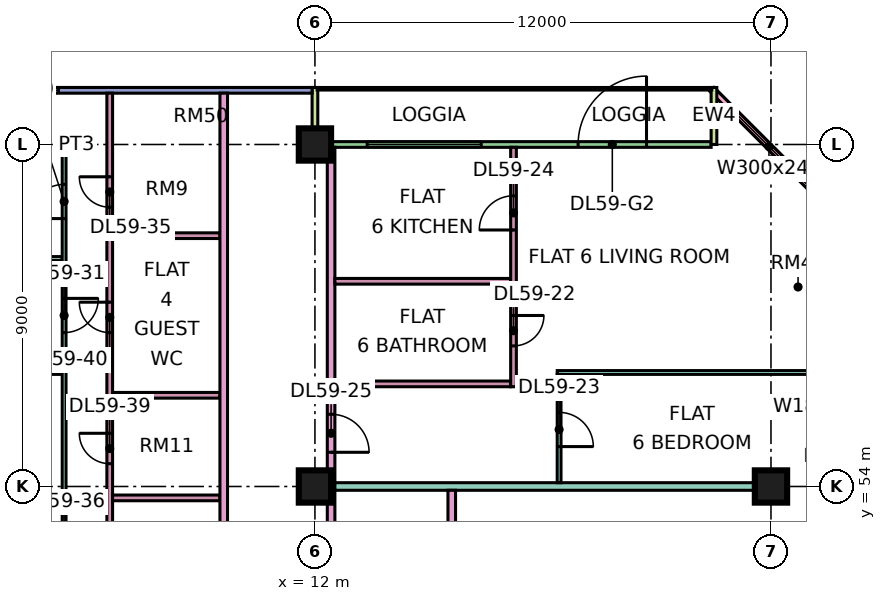
"""IFC4 building model, lengths in metres.
Left out: names, types, materials, properties, quantities, classifications, styles, units other than length and angle.
Written with IfcOpenShell. Run it as: python <this file> out.ifc"""

import sys

from ifc_helpers import new_model, si_unit, direction, frame, frame_2d, origin, origin_2d, place, context, subcontext, project, spatial, rectangle, extrude, element, fill, save


model = new_model("IFC4")
c1 = context("Model", 3, precision=1e-05, world=origin(), true_north=direction((0.0, 1.0)))
c2 = subcontext(c1, "Body", "Model", "MODEL_VIEW")
j1 = project(units=[si_unit("LENGTHUNIT", "METRE"), si_unit("PLANEANGLEUNIT", "RADIAN")], contexts=[c1])
p1 = place(None, origin())
s1 = spatial("IfcSite", under=j1, at=p1, CompositionType="ELEMENT")
p2 = place(p1, origin())
s2 = spatial("IfcBuilding", under=s1, at=p2, CompositionType="ELEMENT")
p3 = place(p2, frame((0.0, 0.0, 249.15)))
s3 = spatial("IfcBuildingStorey", under=s2, at=p3, CompositionType="ELEMENT", Elevation=249.15)
for number, where, z_axis, x_axis in (
    (1, (12.0, 54.0, 0.0), (0.0, 0.0, 1.0), (1.0, 0.0, 0.0)),
    (2, (12.0, 63.0, 0.0), (0.0, 0.0, 1.0), (1.0, 0.0, 0.0)),
    (3, (24.0, 54.0, 0.0), (0.0, 0.0, 1.0), (1.0, 0.0, 0.0)),
):
    element("IfcColumn", number, at=place(p3, frame(where, z_axis=z_axis, x_axis=x_axis)), inside=s3, PredefinedType="COLUMN", context=c2, shape_type="SweptSolid", body=[
        extrude(rectangle(XDim=0.85, YDim=0.85, at=origin_2d()), origin(), (0.0, 0.0, 1.0), 3.75),
    ])
p4 = place(p3, frame((25.447, 61.447, 0.0), z_axis=(0.0, 0.0, 1.0), x_axis=(-0.707106781187, 0.707106781187, 0.0)))
e4 = element("IfcWall", 4, at=p4, inside=s3, PredefinedType="SOLIDWALL", context=c2, shape_type="SweptSolid", body=[
    extrude(rectangle(XDim=4.243, YDim=0.15, at=frame_2d((2.121, 0.0))), origin(), (0.0, 0.0, 1.0), 3.35),
])
p5 = place(p4, frame((0.621, 0.0, 0.45)))
e5 = element("IfcOpeningElement", 5, at=p5, cuts=e4, PredefinedType="OPENING", context=c2, shape_type="SweptSolid", body=[
    extrude(rectangle(XDim=3.0, YDim=2.4, at=frame_2d((1.5, 1.2))), frame((0.0, 0.085, 0.0), z_axis=(0.0, -1.0, 0.0), x_axis=(1.0, 0.0, 0.0)), (0.0, 0.0, 1.0), 0.17),
])
p6 = place(p3, frame((22.425, 63.0, 0.0), z_axis=(0.0, 0.0, 1.0), x_axis=(-1.0, 0.0, 0.0)))
e6 = element("IfcWall", 6, at=p6, inside=s3, PredefinedType="SOLIDWALL", context=c2, shape_type="SweptSolid", body=[
    extrude(rectangle(XDim=10.35, YDim=0.15, at=frame_2d((5.175, 0.0))), origin(), (0.0, 0.0, 1.0), 3.35),
])
p7 = place(p6, frame((1.7, 0.0, 0.0)))
e7 = element("IfcOpeningElement", 7, at=p7, cuts=e6, PredefinedType="OPENING", context=c2, shape_type="SweptSolid", body=[
    extrude(rectangle(XDim=1.8, YDim=2.4, at=frame_2d((0.9, 1.2))), frame((0.0, 0.085, 0.0), z_axis=(0.0, -1.0, 0.0), x_axis=(1.0, 0.0, 0.0)), (0.0, 0.0, 1.0), 0.17),
])
p8 = place(p6, frame((6.05, 0.0, 0.45)))
e8 = element("IfcOpeningElement", 8, at=p8, cuts=e6, PredefinedType="OPENING", context=c2, shape_type="SweptSolid", body=[
    extrude(rectangle(XDim=3.0, YDim=2.4, at=frame_2d((1.5, 1.2))), frame((0.0, 0.085, 0.0), z_axis=(0.0, -1.0, 0.0), x_axis=(1.0, 0.0, 0.0)), (0.0, 0.0, 1.0), 0.17),
])
for number, where, z_axis, x_axis in (
    (9, (22.5, 64.5, 0.0), (0.0, 0.0, 1.0), (0.0, -1.0, 0.0)),
    (10, (12.0, 64.5, 0.0), (0.0, 0.0, 1.0), (0.0, -1.0, 0.0)),
):
    element("IfcWall", number, at=place(p3, frame(where, z_axis=z_axis, x_axis=x_axis)), inside=s3, PredefinedType="SOLIDWALL", context=c2, shape_type="SweptSolid", body=[
        extrude(rectangle(XDim=1.5, YDim=0.15, at=frame_2d((0.75, 0.0))), origin(), (0.0, 0.0, 1.0), 3.35),
    ])
p9 = place(p3, frame((11.925, 64.425, 0.0), z_axis=(0.0, 0.0, 1.0), x_axis=(-1.0, 0.0, 0.0)))
e11 = element("IfcWall", 11, at=p9, inside=s3, PredefinedType="SOLIDWALL", context=c2, shape_type="SweptSolid", body=[
    extrude(rectangle(XDim=10.425, YDim=0.15, at=frame_2d((5.212, 0.0))), origin(), (0.0, 0.0, 1.0), 3.35),
])
p10 = place(p9, frame((6.675, 0.0, 0.45)))
e12 = element("IfcOpeningElement", 12, at=p10, cuts=e11, PredefinedType="OPENING", context=c2, shape_type="SweptSolid", body=[
    extrude(rectangle(XDim=3.0, YDim=2.4, at=frame_2d((1.5, 1.2))), frame((0.0, 0.085, 0.0), z_axis=(0.0, -1.0, 0.0), x_axis=(1.0, 0.0, 0.0)), (0.0, 0.0, 1.0), 0.17),
])
p11 = place(p3, frame((-1.351, 60.0, 0.0), z_axis=(0.0, 0.0, 1.0), x_axis=(1.0, 0.0, 0.0)))
e13 = element("IfcWall", 13, at=p11, inside=s3, PredefinedType="PARTITIONING", context=c2, shape_type="SweptSolid", body=[
    extrude(rectangle(XDim=6.701, YDim=0.1, at=frame_2d((3.351, 0.0))), origin(), (0.0, 0.0, 1.0), 3.35),
])
p12 = place(p3, frame((-1.35, 57.0, 0.0), z_axis=(0.0, 0.0, 1.0), x_axis=(1.0, 0.0, 0.0)))
e14 = element("IfcWall", 14, at=p12, inside=s3, PredefinedType="PARTITIONING", context=c2, shape_type="SweptSolid", body=[
    extrude(rectangle(XDim=6.7, YDim=0.1, at=frame_2d((3.35, 0.0))), origin(), (0.0, 0.0, 1.0), 3.35),
])
p13 = place(p3, frame((5.4, 36.1, 0.0), z_axis=(0.0, 0.0, 1.0), x_axis=(0.0, 1.0, 0.0)))
e15 = element("IfcWall", 15, at=p13, inside=s3, PredefinedType="PARTITIONING", context=c2, shape_type="SweptSolid", body=[
    extrude(rectangle(XDim=26.95, YDim=0.1, at=frame_2d((13.475, 0.0))), origin(), (0.0, 0.0, 1.0), 3.35),
])
p14 = place(p13, frame((0.95, 0.0, 0.0)))
e16 = element("IfcOpeningElement", 16, at=p14, cuts=e15, PredefinedType="OPENING", context=c2, shape_type="SweptSolid", body=[
    extrude(rectangle(XDim=0.9, YDim=2.1, at=frame_2d((0.45, 1.05))), frame((0.0, 0.06, 0.0), z_axis=(0.0, -1.0, 0.0), x_axis=(1.0, 0.0, 0.0)), (0.0, 0.0, 1.0), 0.12),
])
p15 = place(p13, frame((3.95, 0.0, 0.0)))
e17 = element("IfcOpeningElement", 17, at=p15, cuts=e15, PredefinedType="OPENING", context=c2, shape_type="SweptSolid", body=[
    extrude(rectangle(XDim=0.9, YDim=2.1, at=frame_2d((0.45, 1.05))), frame((0.0, 0.06, 0.0), z_axis=(0.0, -1.0, 0.0), x_axis=(1.0, 0.0, 0.0)), (0.0, 0.0, 1.0), 0.12),
])
p16 = place(p13, frame((6.95, 0.0, 0.0)))
e18 = element("IfcOpeningElement", 18, at=p16, cuts=e15, PredefinedType="OPENING", context=c2, shape_type="SweptSolid", body=[
    extrude(rectangle(XDim=0.9, YDim=2.1, at=frame_2d((0.45, 1.05))), frame((0.0, 0.06, 0.0), z_axis=(0.0, -1.0, 0.0), x_axis=(1.0, 0.0, 0.0)), (0.0, 0.0, 1.0), 0.12),
])
p17 = place(p13, frame((9.95, 0.0, 0.0)))
e19 = element("IfcOpeningElement", 19, at=p17, cuts=e15, PredefinedType="OPENING", context=c2, shape_type="SweptSolid", body=[
    extrude(rectangle(XDim=0.9, YDim=2.1, at=frame_2d((0.45, 1.05))), frame((0.0, 0.06, 0.0), z_axis=(0.0, -1.0, 0.0), x_axis=(1.0, 0.0, 0.0)), (0.0, 0.0, 1.0), 0.12),
])
p18 = place(p13, frame((21.95, 0.0, 0.0)))
e20 = element("IfcOpeningElement", 20, at=p18, cuts=e15, PredefinedType="OPENING", context=c2, shape_type="SweptSolid", body=[
    extrude(rectangle(XDim=0.9, YDim=2.1, at=frame_2d((0.45, 1.05))), frame((0.0, 0.06, 0.0), z_axis=(0.0, -1.0, 0.0), x_axis=(1.0, 0.0, 0.0)), (0.0, 0.0, 1.0), 0.12),
])
p19 = place(p13, frame((24.95, 0.0, 0.0)))
e21 = element("IfcOpeningElement", 21, at=p19, cuts=e15, PredefinedType="OPENING", context=c2, shape_type="SweptSolid", body=[
    extrude(rectangle(XDim=0.9, YDim=2.1, at=frame_2d((0.45, 1.05))), frame((0.0, 0.06, 0.0), z_axis=(0.0, -1.0, 0.0), x_axis=(1.0, 0.0, 0.0)), (0.0, 0.0, 1.0), 0.12),
])
p20 = place(p13, frame((15.95, 0.0, 0.0)))
e22 = element("IfcOpeningElement", 22, at=p20, cuts=e15, PredefinedType="OPENING", context=c2, shape_type="SweptSolid", body=[
    extrude(rectangle(XDim=0.9, YDim=2.1, at=frame_2d((0.45, 1.05))), frame((0.0, 0.06, 0.0), z_axis=(0.0, -1.0, 0.0), x_axis=(1.0, 0.0, 0.0)), (0.0, 0.0, 1.0), 0.12),
])
p21 = place(p3, frame((5.45, 63.0, 0.0), z_axis=(0.0, 0.0, 1.0), x_axis=(1.0, 0.0, 0.0)))
e23 = element("IfcWall", 23, at=p21, inside=s3, PredefinedType="PARTITIONING", context=c2, shape_type="SweptSolid", body=[
    extrude(rectangle(XDim=0.55, YDim=0.1, at=frame_2d((0.275, 0.0))), origin(), (0.0, 0.0, 1.0), 3.35),
])
p22 = place(p3, frame((6.6, 50.35, 0.0), z_axis=(0.0, 0.0, 1.0), x_axis=(0.0, 1.0, 0.0)))
e24 = element("IfcWall", 24, at=p22, inside=s3, PredefinedType="PARTITIONING", context=c2, shape_type="SweptSolid", body=[
    extrude(rectangle(XDim=14.0, YDim=0.15, at=frame_2d((7.0, 0.0))), origin(), (0.0, 0.0, 1.0), 3.35),
])
p23 = place(p22, frame((11.0, 0.0, 0.0)))
e25 = element("IfcOpeningElement", 25, at=p23, cuts=e24, PredefinedType="OPENING", context=c2, shape_type="SweptSolid", body=[
    extrude(rectangle(XDim=0.8, YDim=2.1, at=frame_2d((0.4, 1.05))), frame((0.0, 0.085, 0.0), z_axis=(0.0, -1.0, 0.0), x_axis=(1.0, 0.0, 0.0)), (0.0, 0.0, 1.0), 0.17),
])
p24 = place(p22, frame((4.25, 0.0, 0.0)))
e26 = element("IfcOpeningElement", 26, at=p24, cuts=e24, PredefinedType="OPENING", context=c2, shape_type="SweptSolid", body=[
    extrude(rectangle(XDim=0.8, YDim=2.1, at=frame_2d((0.4, 1.05))), frame((0.0, 0.085, 0.0), z_axis=(0.0, -1.0, 0.0), x_axis=(1.0, 0.0, 0.0)), (0.0, 0.0, 1.0), 0.17),
])
p25 = place(p22, frame((7.7, 0.0, 0.0)))
e27 = element("IfcOpeningElement", 27, at=p25, cuts=e24, PredefinedType="OPENING", context=c2, shape_type="SweptSolid", body=[
    extrude(rectangle(XDim=0.8, YDim=2.1, at=frame_2d((0.4, 1.05))), frame((0.0, 0.085, 0.0), z_axis=(0.0, -1.0, 0.0), x_axis=(1.0, 0.0, 0.0)), (0.0, 0.0, 1.0), 0.17),
])
for number, where, z_axis, x_axis in (
    (28, (6.675, 53.7, 0.0), (0.0, 0.0, 1.0), (1.0, 0.0, 0.0)),
    (29, (6.675, 56.4, 0.0), (0.0, 0.0, 1.0), (1.0, 0.0, 0.0)),
    (30, (6.675, 60.6, 0.0), (0.0, 0.0, 1.0), (1.0, 0.0, 0.0)),
):
    element("IfcWall", number, at=place(p3, frame(where, z_axis=z_axis, x_axis=x_axis)), inside=s3, PredefinedType="PARTITIONING", context=c2, shape_type="SweptSolid", body=[
        extrude(rectangle(XDim=2.825, YDim=0.15, at=frame_2d((1.413, 0.0))), origin(), (0.0, 0.0, 1.0), 3.35),
    ])
p26 = place(p3, frame((9.6, 20.0, 0.0), z_axis=(0.0, 0.0, 1.0), x_axis=(0.0, 1.0, 0.0)))
e31 = element("IfcWall", 31, at=p26, inside=s3, PredefinedType="PARTITIONING", context=c2, shape_type="SweptSolid", body=[
    extrude(rectangle(XDim=44.35, YDim=0.2, at=frame_2d((22.175, 0.0))), origin(), (0.0, 0.0, 1.0), 3.35),
])
p27 = place(p26, frame((28.8, 0.0, 0.0)))
e32 = element("IfcOpeningElement", 32, at=p27, cuts=e31, PredefinedType="OPENING", context=c2, shape_type="SweptSolid", body=[
    extrude(rectangle(XDim=1.0, YDim=2.1, at=frame_2d((0.5, 1.05))), frame((0.0, 0.11, 0.0), z_axis=(0.0, -1.0, 0.0), x_axis=(1.0, 0.0, 0.0)), (0.0, 0.0, 1.0), 0.22),
])
p28 = place(p26, frame((0.6, 0.0, 0.0)))
e33 = element("IfcOpeningElement", 33, at=p28, cuts=e31, PredefinedType="OPENING", context=c2, shape_type="SweptSolid", body=[
    extrude(rectangle(XDim=1.2, YDim=2.1, at=frame_2d((0.6, 1.05))), frame((0.0, 0.11, 0.0), z_axis=(0.0, -1.0, 0.0), x_axis=(1.0, 0.0, 0.0)), (0.0, 0.0, 1.0), 0.22),
])
p29 = place(p26, frame((3.9, 0.0, 0.0)))
e34 = element("IfcOpeningElement", 34, at=p29, cuts=e31, PredefinedType="OPENING", context=c2, shape_type="SweptSolid", body=[
    extrude(rectangle(XDim=1.0, YDim=2.1, at=frame_2d((0.5, 1.05))), frame((0.0, 0.11, 0.0), z_axis=(0.0, -1.0, 0.0), x_axis=(1.0, 0.0, 0.0)), (0.0, 0.0, 1.0), 0.22),
])
p30 = place(p3, frame((12.425, 20.0, 0.0), z_axis=(0.0, 0.0, 1.0), x_axis=(0.0, 1.0, 0.0)))
e35 = element("IfcWall", 35, at=p30, inside=s3, PredefinedType="PARTITIONING", context=c2, shape_type="SweptSolid", body=[
    extrude(rectangle(XDim=42.926, YDim=0.2, at=frame_2d((21.463, 0.0))), origin(), (0.0, 0.0, 1.0), 3.35),
])
p31 = place(p30, frame((7.0, 0.0, 0.0)))
e36 = element("IfcOpeningElement", 36, at=p31, cuts=e35, PredefinedType="OPENING", context=c2, shape_type="SweptSolid", body=[
    extrude(rectangle(XDim=1.0, YDim=2.1, at=frame_2d((0.5, 1.05))), frame((0.0, 0.11, 0.0), z_axis=(0.0, -1.0, 0.0), x_axis=(1.0, 0.0, 0.0)), (0.0, 0.0, 1.0), 0.22),
])
p32 = place(p30, frame((12.95, 0.0, 0.0)))
e37 = element("IfcOpeningElement", 37, at=p32, cuts=e35, PredefinedType="OPENING", context=c2, shape_type="SweptSolid", body=[
    extrude(rectangle(XDim=1.0, YDim=2.1, at=frame_2d((0.5, 1.05))), frame((0.0, 0.11, 0.0), z_axis=(0.0, -1.0, 0.0), x_axis=(1.0, 0.0, 0.0)), (0.0, 0.0, 1.0), 0.22),
])
p33 = place(p30, frame((16.75, 0.0, 0.0)))
e38 = element("IfcOpeningElement", 38, at=p33, cuts=e35, PredefinedType="OPENING", context=c2, shape_type="SweptSolid", body=[
    extrude(rectangle(XDim=1.0, YDim=2.1, at=frame_2d((0.5, 1.05))), frame((0.0, 0.11, 0.0), z_axis=(0.0, -1.0, 0.0), x_axis=(1.0, 0.0, 0.0)), (0.0, 0.0, 1.0), 0.22),
])
p34 = place(p30, frame((34.9, 0.0, 0.0)))
e39 = element("IfcOpeningElement", 39, at=p34, cuts=e35, PredefinedType="OPENING", context=c2, shape_type="SweptSolid", body=[
    extrude(rectangle(XDim=1.0, YDim=2.1, at=frame_2d((0.5, 1.05))), frame((0.0, 0.11, 0.0), z_axis=(0.0, -1.0, 0.0), x_axis=(1.0, 0.0, 0.0)), (0.0, 0.0, 1.0), 0.22),
])
p35 = place(p30, frame((1.15, 0.0, 0.0)))
e40 = element("IfcOpeningElement", 40, at=p35, cuts=e35, PredefinedType="OPENING", context=c2, shape_type="SweptSolid", body=[
    extrude(rectangle(XDim=1.8, YDim=2.1, at=frame_2d((0.9, 1.05))), frame((0.0, 0.11, 0.0), z_axis=(0.0, -1.0, 0.0), x_axis=(1.0, 0.0, 0.0)), (0.0, 0.0, 1.0), 0.22),
])
p36 = place(p30, frame((28.6, 0.0, 0.0)))
e41 = element("IfcOpeningElement", 41, at=p36, cuts=e35, PredefinedType="OPENING", context=c2, shape_type="SweptSolid", body=[
    extrude(rectangle(XDim=1.8, YDim=2.1, at=frame_2d((0.9, 1.05))), frame((0.0, 0.11, 0.0), z_axis=(0.0, -1.0, 0.0), x_axis=(1.0, 0.0, 0.0)), (0.0, 0.0, 1.0), 0.22),
])
p37 = place(p3, frame((12.525, 54.0, 0.0), z_axis=(0.0, 0.0, 1.0), x_axis=(1.0, 0.0, 0.0)))
e42 = element("IfcWall", 42, at=p37, inside=s3, PredefinedType="PARTITIONING", context=c2, shape_type="SweptSolid", body=[
    extrude(rectangle(XDim=11.475, YDim=0.2, at=frame_2d((5.738, 0.0))), origin(), (0.0, 0.0, 1.0), 3.35),
])
for number, where, z_axis, x_axis in (
    (43, (12.525, 56.7, 0.0), (0.0, 0.0, 1.0), (1.0, 0.0, 0.0)),
    (44, (12.525, 59.4, 0.0), (0.0, 0.0, 1.0), (1.0, 0.0, 0.0)),
):
    element("IfcWall", number, at=place(p3, frame(where, z_axis=z_axis, x_axis=x_axis)), inside=s3, PredefinedType="PARTITIONING", context=c2, shape_type="SweptSolid", body=[
        extrude(rectangle(XDim=4.625, YDim=0.15, at=frame_2d((2.312, 0.0))), origin(), (0.0, 0.0, 1.0), 3.35),
    ])
p38 = place(p3, frame((15.6, 51.225, 0.0), z_axis=(0.0, 0.0, 1.0), x_axis=(0.0, 1.0, 0.0)))
e45 = element("IfcWall", 45, at=p38, inside=s3, PredefinedType="PARTITIONING", context=c2, shape_type="SweptSolid", body=[
    extrude(rectangle(XDim=2.675, YDim=0.2, at=frame_2d((1.337, 0.0))), origin(), (0.0, 0.0, 1.0), 3.35),
])
p39 = place(p3, frame((17.225, 56.625, 0.0), z_axis=(0.0, 0.0, 1.0), x_axis=(0.0, 1.0, 0.0)))
e46 = element("IfcWall", 46, at=p39, inside=s3, PredefinedType="PARTITIONING", context=c2, shape_type="SweptSolid", body=[
    extrude(rectangle(XDim=6.301, YDim=0.15, at=frame_2d((3.15, 0.0))), origin(), (0.0, 0.0, 1.0), 3.35),
])
p40 = place(p39, frame((1.075, 0.0, 0.0)))
e47 = element("IfcOpeningElement", 47, at=p40, cuts=e46, PredefinedType="OPENING", context=c2, shape_type="SweptSolid", body=[
    extrude(rectangle(XDim=0.8, YDim=2.1, at=frame_2d((0.4, 1.05))), frame((0.0, 0.085, 0.0), z_axis=(0.0, -1.0, 0.0), x_axis=(1.0, 0.0, 0.0)), (0.0, 0.0, 1.0), 0.17),
])
p41 = place(p39, frame((4.125, 0.0, 0.0)))
e48 = element("IfcOpeningElement", 48, at=p41, cuts=e46, PredefinedType="OPENING", context=c2, shape_type="SweptSolid", body=[
    extrude(rectangle(XDim=0.9, YDim=2.1, at=frame_2d((0.45, 1.05))), frame((0.0, 0.085, 0.0), z_axis=(0.0, -1.0, 0.0), x_axis=(1.0, 0.0, 0.0)), (0.0, 0.0, 1.0), 0.17),
])
p42 = place(p3, frame((18.375, 57.0, 0.0), z_axis=(0.0, 0.0, 1.0), x_axis=(1.0, 0.0, 0.0)))
e49 = element("IfcWall", 49, at=p42, inside=s3, PredefinedType="PARTITIONING", context=c2, shape_type="SweptSolid", body=[
    extrude(rectangle(XDim=6.975, YDim=0.1, at=frame_2d((3.488, 0.0))), origin(), (0.0, 0.0, 1.0), 3.35),
])
p43 = place(p3, frame((18.425, 54.1, 0.0), z_axis=(0.0, 0.0, 1.0), x_axis=(0.0, 1.0, 0.0)))
e50 = element("IfcWall", 50, at=p43, inside=s3, PredefinedType="PARTITIONING", context=c2, shape_type="SweptSolid", body=[
    extrude(rectangle(XDim=2.85, YDim=0.1, at=frame_2d((1.425, 0.0))), origin(), (0.0, 0.0, 1.0), 3.35),
])
p44 = place(p43, frame((0.95, 0.0, 0.0)))
e51 = element("IfcOpeningElement", 51, at=p44, cuts=e50, PredefinedType="OPENING", context=c2, shape_type="SweptSolid", body=[
    extrude(rectangle(XDim=0.9, YDim=2.1, at=frame_2d((0.45, 1.05))), frame((0.0, 0.06, 0.0), z_axis=(0.0, -1.0, 0.0), x_axis=(1.0, 0.0, 0.0)), (0.0, 0.0, 1.0), 0.12),
])
p45 = place(p5, origin())
e52 = element("IfcWindow", 52, at=p45, inside=s3, PartitioningType="SINGLE_PANEL", PredefinedType="WINDOW", context=c2, shape_type="SweptSolid", body=[
    extrude(rectangle(XDim=3.0, YDim=2.4, at=frame_2d((1.5, 1.2))), frame((0.0, 0.03, 0.0), z_axis=(0.0, -1.0, 0.0), x_axis=(1.0, 0.0, 0.0)), (0.0, 0.0, 1.0), 0.06),
])
fill(e5, e52)
p46 = place(p7, frame((1.8, 0.0, 0.0), z_axis=(0.0, 0.0, 1.0), x_axis=(-1.0, 0.0, 0.0)))
e53 = element("IfcDoor", 53, at=p46, inside=s3, OperationType="DOUBLE_DOOR_SINGLE_SWING", PredefinedType="DOOR", context=c2, shape_type="SweptSolid", body=[
    extrude(rectangle(XDim=1.8, YDim=2.4, at=frame_2d((0.9, 1.2))), frame((0.0, 0.025, 0.0), z_axis=(0.0, -1.0, 0.0), x_axis=(1.0, 0.0, 0.0)), (0.0, 0.0, 1.0), 0.05),
])
fill(e7, e53)
p47 = place(p8, origin())
e54 = element("IfcWindow", 54, at=p47, inside=s3, PartitioningType="SINGLE_PANEL", PredefinedType="WINDOW", context=c2, shape_type="SweptSolid", body=[
    extrude(rectangle(XDim=3.0, YDim=2.4, at=frame_2d((1.5, 1.2))), frame((0.0, 0.03, 0.0), z_axis=(0.0, -1.0, 0.0), x_axis=(1.0, 0.0, 0.0)), (0.0, 0.0, 1.0), 0.06),
])
fill(e8, e54)
p48 = place(p10, origin())
e55 = element("IfcWindow", 55, at=p48, inside=s3, PartitioningType="SINGLE_PANEL", PredefinedType="WINDOW", context=c2, shape_type="SweptSolid", body=[
    extrude(rectangle(XDim=3.0, YDim=2.4, at=frame_2d((1.5, 1.2))), frame((0.0, 0.03, 0.0), z_axis=(0.0, -1.0, 0.0), x_axis=(1.0, 0.0, 0.0)), (0.0, 0.0, 1.0), 0.06),
])
fill(e12, e55)
p49 = place(p40, origin())
e56 = element("IfcDoor", 56, at=p49, inside=s3, OperationType="SINGLE_SWING_RIGHT", PredefinedType="DOOR", context=c2, shape_type="SweptSolid", body=[
    extrude(rectangle(XDim=0.8, YDim=2.1, at=frame_2d((0.4, 1.05))), frame((0.0, 0.025, 0.0), z_axis=(0.0, -1.0, 0.0), x_axis=(1.0, 0.0, 0.0)), (0.0, 0.0, 1.0), 0.05),
])
fill(e47, e56)
p50 = place(p44, frame((0.9, 0.0, 0.0), z_axis=(0.0, 0.0, 1.0), x_axis=(-1.0, 0.0, 0.0)))
e57 = element("IfcDoor", 57, at=p50, inside=s3, OperationType="SINGLE_SWING_LEFT", PredefinedType="DOOR", context=c2, shape_type="SweptSolid", body=[
    extrude(rectangle(XDim=0.9, YDim=2.1, at=frame_2d((0.45, 1.05))), frame((0.0, 0.025, 0.0), z_axis=(0.0, -1.0, 0.0), x_axis=(1.0, 0.0, 0.0)), (0.0, 0.0, 1.0), 0.05),
])
fill(e51, e57)
p51 = place(p41, origin())
e58 = element("IfcDoor", 58, at=p51, inside=s3, OperationType="SINGLE_SWING_LEFT", PredefinedType="DOOR", context=c2, shape_type="SweptSolid", body=[
    extrude(rectangle(XDim=0.9, YDim=2.1, at=frame_2d((0.45, 1.05))), frame((0.0, 0.025, 0.0), z_axis=(0.0, -1.0, 0.0), x_axis=(1.0, 0.0, 0.0)), (0.0, 0.0, 1.0), 0.05),
])
fill(e48, e58)
p52 = place(p34, frame((1.0, 0.0, 0.0), z_axis=(0.0, 0.0, 1.0), x_axis=(-1.0, 0.0, 0.0)))
e59 = element("IfcDoor", 59, at=p52, inside=s3, OperationType="SINGLE_SWING_LEFT", PredefinedType="DOOR", context=c2, shape_type="SweptSolid", body=[
    extrude(rectangle(XDim=1.0, YDim=2.1, at=frame_2d((0.5, 1.05))), frame((0.0, 0.025, 0.0), z_axis=(0.0, -1.0, 0.0), x_axis=(1.0, 0.0, 0.0)), (0.0, 0.0, 1.0), 0.05),
])
fill(e39, e59)
p53 = place(p18, origin())
e60 = element("IfcDoor", 60, at=p53, inside=s3, OperationType="SINGLE_SWING_RIGHT", PredefinedType="DOOR", context=c2, shape_type="SweptSolid", body=[
    extrude(rectangle(XDim=0.9, YDim=2.1, at=frame_2d((0.45, 1.05))), frame((0.0, 0.025, 0.0), z_axis=(0.0, -1.0, 0.0), x_axis=(1.0, 0.0, 0.0)), (0.0, 0.0, 1.0), 0.05),
])
fill(e20, e60)
p54 = place(p19, origin())
e61 = element("IfcDoor", 61, at=p54, inside=s3, OperationType="SINGLE_SWING_LEFT", PredefinedType="DOOR", context=c2, shape_type="SweptSolid", body=[
    extrude(rectangle(XDim=0.9, YDim=2.1, at=frame_2d((0.45, 1.05))), frame((0.0, 0.025, 0.0), z_axis=(0.0, -1.0, 0.0), x_axis=(1.0, 0.0, 0.0)), (0.0, 0.0, 1.0), 0.05),
])
fill(e21, e61)
p55 = place(p23, frame((0.8, 0.0, 0.0), z_axis=(0.0, 0.0, 1.0), x_axis=(-1.0, 0.0, 0.0)))
e62 = element("IfcDoor", 62, at=p55, inside=s3, OperationType="SINGLE_SWING_RIGHT", PredefinedType="DOOR", context=c2, shape_type="SweptSolid", body=[
    extrude(rectangle(XDim=0.8, YDim=2.1, at=frame_2d((0.4, 1.05))), frame((0.0, 0.025, 0.0), z_axis=(0.0, -1.0, 0.0), x_axis=(1.0, 0.0, 0.0)), (0.0, 0.0, 1.0), 0.05),
])
fill(e25, e62)
p56 = place(p24, frame((0.8, 0.0, 0.0), z_axis=(0.0, 0.0, 1.0), x_axis=(-1.0, 0.0, 0.0)))
e63 = element("IfcDoor", 63, at=p56, inside=s3, OperationType="SINGLE_SWING_RIGHT", PredefinedType="DOOR", context=c2, shape_type="SweptSolid", body=[
    extrude(rectangle(XDim=0.8, YDim=2.1, at=frame_2d((0.4, 1.05))), frame((0.0, 0.025, 0.0), z_axis=(0.0, -1.0, 0.0), x_axis=(1.0, 0.0, 0.0)), (0.0, 0.0, 1.0), 0.05),
])
fill(e26, e63)
p57 = place(p25, frame((0.8, 0.0, 0.0), z_axis=(0.0, 0.0, 1.0), x_axis=(-1.0, 0.0, 0.0)))
e64 = element("IfcDoor", 64, at=p57, inside=s3, OperationType="SINGLE_SWING_RIGHT", PredefinedType="DOOR", context=c2, shape_type="SweptSolid", body=[
    extrude(rectangle(XDim=0.8, YDim=2.1, at=frame_2d((0.4, 1.05))), frame((0.0, 0.025, 0.0), z_axis=(0.0, -1.0, 0.0), x_axis=(1.0, 0.0, 0.0)), (0.0, 0.0, 1.0), 0.05),
])
fill(e27, e64)
save(model, sys.argv[1])
